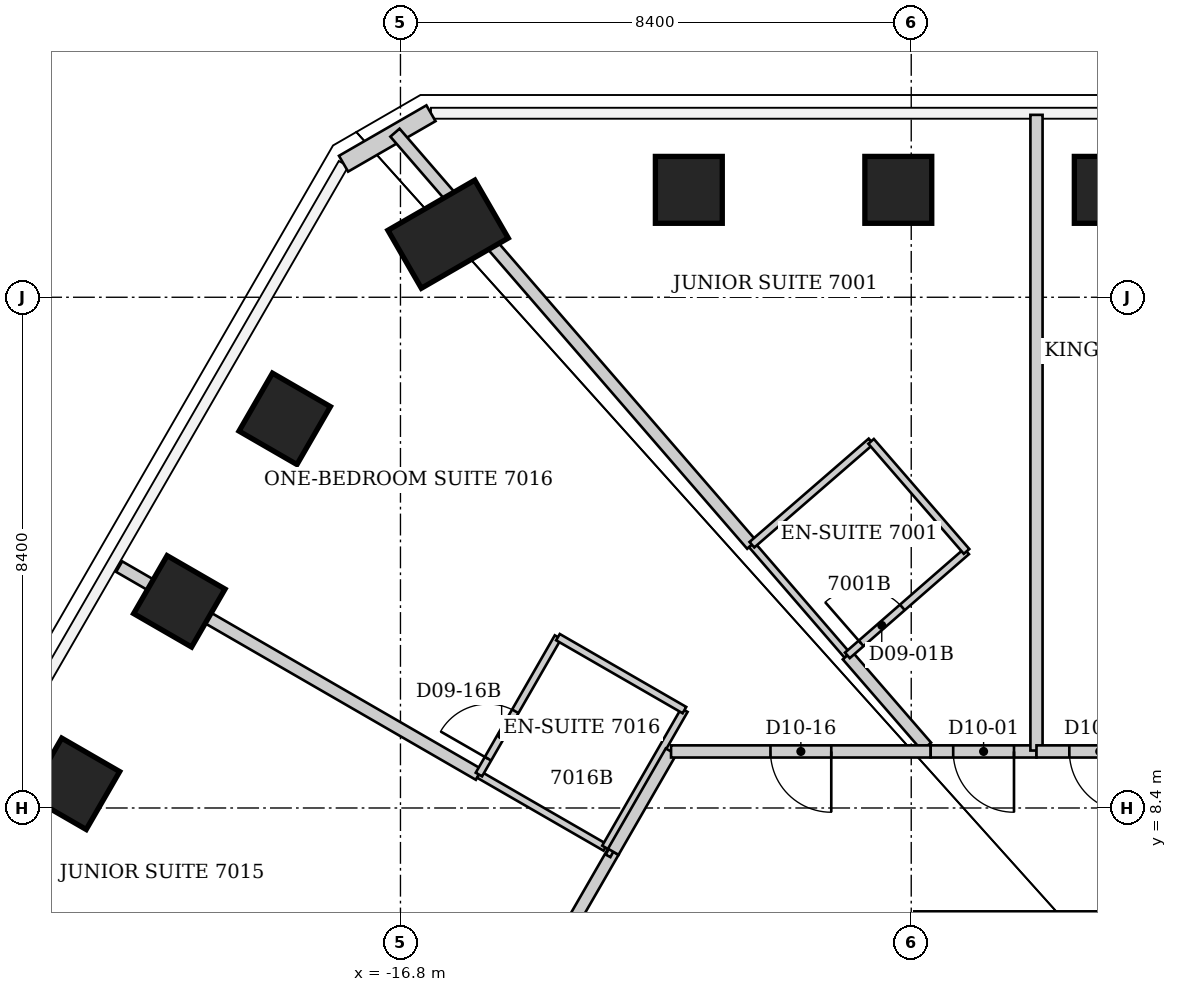
"""IFC4 building model, lengths in metres.
Left out: names, types, materials, properties, quantities, classifications, styles, units other than length and angle.
Written with IfcOpenShell. Run it as: python <this file> out.ifc"""

import sys

from ifc_helpers import new_model, si_unit, direction, frame, frame_2d, origin, origin_2d, place, context, subcontext, project, spatial, rectangle, extrude, element, fill, save


model = new_model("IFC4")
c1 = context("Model", 3, precision=1e-05, world=origin(), true_north=direction((0.0, 1.0)))
c2 = subcontext(c1, "Body", "Model", "MODEL_VIEW")
j1 = project(units=[si_unit("LENGTHUNIT", "METRE"), si_unit("PLANEANGLEUNIT", "RADIAN")], contexts=[c1])
p1 = place(None, origin())
s1 = spatial("IfcSite", under=j1, at=p1, CompositionType="ELEMENT")
p2 = place(p1, origin())
s2 = spatial("IfcBuilding", under=s1, at=p2, CompositionType="ELEMENT")
p3 = place(p2, frame((0.0, 0.0, 279.8)))
s3 = spatial("IfcBuildingStorey", under=s2, at=p3, CompositionType="ELEMENT", Elevation=279.8)
for number, where, z_axis, x_axis in (
    (1, (-12.058, 18.566, 0.0), (0.0, 0.0, 1.0), (0.0, 1.0, 0.0)),
    (2, (-8.613, 18.566, 0.0), (0.0, 0.0, 1.0), (0.0, 1.0, 0.0)),
    (3, (-5.167, 18.566, 0.0), (0.0, 0.0, 1.0), (0.0, 1.0, 0.0)),
    (4, (-22.169, 8.798, 0.0), (0.0, 0.0, 1.0), (-0.866, 0.5, 0.0)),
    (5, (-20.437, 11.799, 0.0), (0.0, 0.0, 1.0), (-0.866, 0.5, 0.0)),
    (6, (-18.704, 14.8, 0.0), (0.0, 0.0, 1.0), (-0.866, 0.5, 0.0)),
):
    element("IfcColumn", number, at=place(p3, frame(where, z_axis=z_axis, x_axis=x_axis)), inside=s3, PredefinedType="COLUMN", context=c2, shape_type="SweptSolid", body=[
        extrude(rectangle(XDim=1.1, YDim=1.1, at=origin_2d()), origin(), (0.0, 0.0, 1.0), 3.8),
    ])
p4 = place(p3, frame((-16.017, 17.837, 0.0), z_axis=(0.0, 0.0, 1.0), x_axis=(-0.5, 0.866025403784, 0.0)))
e7 = element("IfcColumn", 7, at=p4, inside=s3, PredefinedType="COLUMN", context=c2, shape_type="SweptSolid", body=[
    extrude(rectangle(XDim=1.1, YDim=1.65, at=origin_2d()), origin(), (0.0, 0.0, 1.0), 3.8),
])
p5 = place(p3, frame((-8.35, 6.4, 0.0), z_axis=(0.0, 0.0, 1.0), x_axis=(1.0, 0.0, 0.0)))
e8 = element("IfcWall", 8, at=p5, inside=s3, PredefinedType="SHEAR", context=c2, shape_type="SweptSolid", body=[
    extrude(rectangle(XDim=16.7, YDim=0.6, at=frame_2d((8.35, 0.0))), origin(), (0.0, 0.0, 1.0), 3.8),
])
p6 = place(p5, frame((6.488, 0.0, 0.0)))
e9 = element("IfcOpeningElement", 9, at=p6, cuts=e8, PredefinedType="OPENING", context=c2, shape_type="SweptSolid", body=[
    extrude(rectangle(XDim=1.1, YDim=2.1, at=frame_2d((0.55, 1.05))), frame((0.0, 0.3, 0.0), z_axis=(0.0, -1.0, 0.0), x_axis=(1.0, 0.0, 0.0)), (0.0, 0.0, 1.0), 0.6),
])
p7 = place(p5, frame((9.113, 0.0, 0.0)))
e10 = element("IfcOpeningElement", 10, at=p7, cuts=e8, PredefinedType="OPENING", context=c2, shape_type="SweptSolid", body=[
    extrude(rectangle(XDim=1.1, YDim=2.1, at=frame_2d((0.55, 1.05))), frame((0.0, 0.3, 0.0), z_axis=(0.0, -1.0, 0.0), x_axis=(1.0, 0.0, 0.0)), (0.0, 0.0, 1.0), 0.6),
])
p8 = place(p5, frame((11.738, 0.0, 0.0)))
e11 = element("IfcOpeningElement", 11, at=p8, cuts=e8, PredefinedType="OPENING", context=c2, shape_type="SweptSolid", body=[
    extrude(rectangle(XDim=1.1, YDim=2.1, at=frame_2d((0.55, 1.05))), frame((0.0, 0.3, 0.0), z_axis=(0.0, -1.0, 0.0), x_axis=(1.0, 0.0, 0.0)), (0.0, 0.0, 1.0), 0.6),
])
p9 = place(p5, frame((14.363, 0.0, 0.0)))
e12 = element("IfcOpeningElement", 12, at=p9, cuts=e8, PredefinedType="OPENING", context=c2, shape_type="SweptSolid", body=[
    extrude(rectangle(XDim=1.1, YDim=2.1, at=frame_2d((0.55, 1.05))), frame((0.0, 0.3, 0.0), z_axis=(0.0, -1.0, 0.0), x_axis=(1.0, 0.0, 0.0)), (0.0, 0.0, 1.0), 0.6),
])
p10 = place(p3, frame((-17.736, 18.996, 0.0), z_axis=(0.0, 0.0, 1.0), x_axis=(0.866026405774, 0.499998264499, 0.0)))
e13 = element("IfcWall", 13, at=p10, inside=s3, PredefinedType="SOLIDWALL", context=c2, shape_type="SweptSolid", body=[
    extrude(rectangle(XDim=1.66, YDim=0.3, at=frame_2d((0.83, 0.0))), origin(), (0.0, 0.0, 1.0), 3.64),
])
p11 = place(p3, frame((-21.426, 12.37, 0.0), z_axis=(0.0, 0.0, 1.0), x_axis=(0.86575224659, -0.500472823962, 0.0)))
e14 = element("IfcWall", 14, at=p11, inside=s3, PredefinedType="PARTITIONING", context=c2, shape_type="SweptSolid", body=[
    extrude(rectangle(XDim=6.833, YDim=0.2, at=frame_2d((3.417, 0.0))), origin(), (0.0, 0.0, 1.0), 2.878),
])
p12 = place(p3, frame((-16.89, 19.507, 0.0), z_axis=(0.0, 0.0, 1.0), x_axis=(0.654499193584, -0.756062699515, 0.0)))
e15 = element("IfcWall", 15, at=p12, inside=s3, PredefinedType="PARTITIONING", context=c2, shape_type="SweptSolid", body=[
    extrude(rectangle(XDim=8.966, YDim=0.2, at=frame_2d((4.483, 0.0))), origin(), (0.0, 0.0, 1.0), 3.64),
])
p13 = place(p3, frame((-15.64, 3.62, 0.0), z_axis=(0.0, 0.0, 1.0), x_axis=(0.499361596599, 0.866393672555, 0.0)))
e16 = element("IfcWall", 16, at=p13, inside=s3, PredefinedType="PARTITIONING", context=c2, shape_type="SweptSolid", body=[
    extrude(rectangle(XDim=4.686, YDim=0.2, at=frame_2d((2.343, 0.0))), origin(), (0.0, 0.0, 1.0), 3.64),
])
p14 = place(p13, frame((2.043, 0.0, 0.0)))
e17 = element("IfcOpeningElement", 17, at=p14, cuts=e16, PredefinedType="OPENING", context=c2, shape_type="SweptSolid", body=[
    extrude(rectangle(XDim=1.0, YDim=2.13, at=frame_2d((0.5, 1.065))), frame((0.0, 0.1, 0.0), z_axis=(0.0, -1.0, 0.0), x_axis=(1.0, 0.0, 0.0)), (0.0, 0.0, 1.0), 0.2),
])
p15 = place(p3, frame((-15.51, 8.95, 0.0), z_axis=(0.0, 0.0, 1.0), x_axis=(0.866202511239, -0.499693115345, 0.0)))
e18 = element("IfcWall", 18, at=p15, inside=s3, PredefinedType="PARTITIONING", context=c2, shape_type="SweptSolid", body=[
    extrude(rectangle(XDim=2.401, YDim=0.12, at=frame_2d((1.201, 0.0))), origin(), (0.0, 0.0, 1.0), 2.878),
])
p16 = place(p3, frame((-14.21, 11.21, 0.0), z_axis=(0.0, 0.0, 1.0), x_axis=(-0.498627694264, -0.866816256489, 0.0)))
e19 = element("IfcWall", 19, at=p16, inside=s3, PredefinedType="PARTITIONING", context=c2, shape_type="SweptSolid", body=[
    extrude(rectangle(XDim=2.607, YDim=0.12, at=frame_2d((1.304, 0.0))), origin(), (0.0, 0.0, 1.0), 3.64),
])
p17 = place(p16, frame((1.407, 0.0, 0.0)))
e20 = element("IfcOpeningElement", 20, at=p17, cuts=e19, PredefinedType="OPENING", context=c2, shape_type="SweptSolid", body=[
    extrude(rectangle(XDim=0.9, YDim=2.03, at=frame_2d((0.45, 1.015))), frame((0.0, 0.06, 0.0), z_axis=(0.0, -1.0, 0.0), x_axis=(1.0, 0.0, 0.0)), (0.0, 0.0, 1.0), 0.12),
])
p18 = place(p3, frame((-13.43, 7.75, 0.0), z_axis=(0.0, 0.0, 1.0), x_axis=(0.498557331759, 0.866856728041, 0.0)))
e21 = element("IfcWall", 21, at=p18, inside=s3, PredefinedType="PARTITIONING", context=c2, shape_type="SweptSolid", body=[
    extrude(rectangle(XDim=2.607, YDim=0.12, at=frame_2d((1.304, 0.0))), origin(), (0.0, 0.0, 1.0), 3.64),
])
p19 = place(p3, frame((-13.377, 7.721, 0.0), z_axis=(0.0, 0.0, 1.0), x_axis=(0.880650010303, -0.473767410606, 0.0)))
e22 = element("IfcWall", 22, at=p19, inside=s3, PredefinedType="PARTITIONING", context=c2, shape_type="SweptSolid", body=[
    extrude(rectangle(XDim=0.088, YDim=0.2, at=frame_2d((0.044, 0.0))), origin(), (0.0, 0.0, 1.0), 3.64),
])
p20 = place(p3, frame((-13.3, 7.68, 0.0), z_axis=(0.0, 0.0, 1.0), x_axis=(0.498911917133, 0.866652697996, 0.0)))
e23 = element("IfcWall", 23, at=p20, inside=s3, PredefinedType="PARTITIONING", context=c2, shape_type="SweptSolid", body=[
    extrude(rectangle(XDim=1.904, YDim=0.2, at=frame_2d((0.952, 0.0))), origin(), (0.0, 0.0, 1.0), 3.64),
])
p21 = place(p3, frame((-12.13, 10.01, 0.0), z_axis=(0.0, 0.0, 1.0), x_axis=(-0.866202511239, 0.499693115345, 0.0)))
e24 = element("IfcWall", 24, at=p21, inside=s3, PredefinedType="PARTITIONING", context=c2, shape_type="SweptSolid", body=[
    extrude(rectangle(XDim=2.401, YDim=0.12, at=frame_2d((1.201, 0.0))), origin(), (0.0, 0.0, 1.0), 3.64),
])
p22 = place(p3, frame((-11.022, 12.728, 0.0), z_axis=(0.0, 0.0, 1.0), x_axis=(0.654005869514, -0.756489472921, 0.0)))
e25 = element("IfcWall", 25, at=p22, inside=s3, PredefinedType="PARTITIONING", context=c2, shape_type="SweptSolid", body=[
    extrude(rectangle(XDim=2.404, YDim=0.12, at=frame_2d((1.202, 0.0))), origin(), (0.0, 0.0, 1.0), 3.64),
])
p23 = place(p3, frame((-9.45, 10.91, 0.0), z_axis=(0.0, 0.0, 1.0), x_axis=(0.655103686609, -0.755538986282, 0.0)))
e26 = element("IfcWall", 26, at=p23, inside=s3, PredefinedType="PARTITIONING", context=c2, shape_type="SweptSolid", body=[
    extrude(rectangle(XDim=1.986, YDim=0.2, at=frame_2d((0.993, 0.0))), origin(), (0.0, 0.0, 1.0), 3.64),
])
p24 = place(p3, frame((-9.45, 10.91, 0.0), z_axis=(0.0, 0.0, 1.0), x_axis=(0.753482987084, 0.657467404649, 0.0)))
e27 = element("IfcWall", 27, at=p24, inside=s3, PredefinedType="PARTITIONING", context=c2, shape_type="SweptSolid", body=[
    extrude(rectangle(XDim=2.601, YDim=0.12, at=frame_2d((1.301, 0.0))), origin(), (0.0, 0.0, 1.0), 3.64),
])
p25 = place(p24, frame((0.3, 0.0, 0.0)))
e28 = element("IfcOpeningElement", 28, at=p25, cuts=e27, PredefinedType="OPENING", context=c2, shape_type="SweptSolid", body=[
    extrude(rectangle(XDim=0.9, YDim=2.03, at=frame_2d((0.45, 1.015))), frame((0.0, 0.06, 0.0), z_axis=(0.0, -1.0, 0.0), x_axis=(1.0, 0.0, 0.0)), (0.0, 0.0, 1.0), 0.12),
])
p26 = place(p3, frame((-9.06, 14.43, 0.0), z_axis=(0.0, 0.0, 1.0), x_axis=(-0.755437535555, -0.655220672655, 0.0)))
e29 = element("IfcWall", 29, at=p26, inside=s3, PredefinedType="PARTITIONING", context=c2, shape_type="SweptSolid", body=[
    extrude(rectangle(XDim=2.594, YDim=0.12, at=frame_2d((1.297, 0.0))), origin(), (0.0, 0.0, 1.0), 3.64),
])
p27 = place(p3, frame((-8.08, 9.33, 0.0), z_axis=(0.0, 0.0, 1.0), x_axis=(-1.0, 0.0, 0.0)))
e30 = element("IfcWall", 30, at=p27, inside=s3, PredefinedType="PARTITIONING", context=c2, shape_type="SweptSolid", body=[
    extrude(rectangle(XDim=4.27, YDim=0.2, at=frame_2d((2.135, 0.0))), origin(), (0.0, 0.0, 1.0), 3.64),
])
p28 = place(p27, frame((1.635, 0.0, 0.0)))
e31 = element("IfcOpeningElement", 31, at=p28, cuts=e30, PredefinedType="OPENING", context=c2, shape_type="SweptSolid", body=[
    extrude(rectangle(XDim=1.0, YDim=2.13, at=frame_2d((0.5, 1.065))), frame((0.0, 0.1, 0.0), z_axis=(0.0, -1.0, 0.0), x_axis=(1.0, 0.0, 0.0)), (0.0, 0.0, 1.0), 0.2),
])
p29 = place(p3, frame((-7.49, 12.62, 0.0), z_axis=(0.0, 0.0, 1.0), x_axis=(-0.655302876176, 0.755366229372, 0.0)))
e32 = element("IfcWall", 32, at=p29, inside=s3, PredefinedType="PARTITIONING", context=c2, shape_type="SweptSolid", body=[
    extrude(rectangle(XDim=2.396, YDim=0.12, at=frame_2d((1.198, 0.0))), origin(), (0.0, 0.0, 1.0), 3.64),
])
p30 = place(p3, frame((-6.34, 9.33, 0.0), z_axis=(0.0, 0.0, 1.0), x_axis=(-1.0, 0.0, 0.0)))
e33 = element("IfcWall", 33, at=p30, inside=s3, PredefinedType="PARTITIONING", context=c2, shape_type="SweptSolid", body=[
    extrude(rectangle(XDim=1.74, YDim=0.2, at=frame_2d((0.87, 0.0))), origin(), (0.0, 0.0, 1.0), 3.64),
])
p31 = place(p30, frame((0.37, 0.0, 0.0)))
e34 = element("IfcOpeningElement", 34, at=p31, cuts=e33, PredefinedType="OPENING", context=c2, shape_type="SweptSolid", body=[
    extrude(rectangle(XDim=1.0, YDim=2.13, at=frame_2d((0.5, 1.065))), frame((0.0, 0.1, 0.0), z_axis=(0.0, -1.0, 0.0), x_axis=(1.0, 0.0, 0.0)), (0.0, 0.0, 1.0), 0.2),
])
p32 = place(p3, frame((-6.34, 19.8, 0.0), z_axis=(0.0, 0.0, 1.0), x_axis=(0.0, -1.0, 0.0)))
e35 = element("IfcWall", 35, at=p32, inside=s3, PredefinedType="PARTITIONING", context=c2, shape_type="SweptSolid", body=[
    extrude(rectangle(XDim=10.455, YDim=0.2, at=frame_2d((5.228, 0.0))), origin(), (0.0, 0.0, 1.0), 3.64),
])
p33 = place(p3, frame((-4.26, 9.33, 0.0), z_axis=(0.0, 0.0, 1.0), x_axis=(-1.0, 0.0, 0.0)))
e36 = element("IfcWall", 36, at=p33, inside=s3, PredefinedType="PARTITIONING", context=c2, shape_type="SweptSolid", body=[
    extrude(rectangle(XDim=2.08, YDim=0.2, at=frame_2d((1.04, 0.0))), origin(), (0.0, 0.0, 1.0), 3.64),
])
p34 = place(p33, frame((0.54, 0.0, 0.0)))
e37 = element("IfcOpeningElement", 37, at=p34, cuts=e36, PredefinedType="OPENING", context=c2, shape_type="SweptSolid", body=[
    extrude(rectangle(XDim=1.0, YDim=2.13, at=frame_2d((0.5, 1.065))), frame((0.0, 0.1, 0.0), z_axis=(0.0, -1.0, 0.0), x_axis=(1.0, 0.0, 0.0)), (0.0, 0.0, 1.0), 0.2),
])
p35 = place(p31, origin())
e38 = element("IfcDoor", 38, at=p35, inside=s3, OperationType="SINGLE_SWING_LEFT", PredefinedType="DOOR", context=c2, shape_type="SweptSolid", body=[
    extrude(rectangle(XDim=1.0, YDim=2.13, at=frame_2d((0.5, 1.065))), frame((0.0, 0.025, 0.0), z_axis=(0.0, -1.0, 0.0), x_axis=(1.0, 0.0, 0.0)), (0.0, 0.0, 1.0), 0.05),
])
fill(e34, e38)
p36 = place(p25, origin())
e39 = element("IfcDoor", 39, at=p36, inside=s3, OperationType="SINGLE_SWING_LEFT", PredefinedType="DOOR", context=c2, shape_type="SweptSolid", body=[
    extrude(rectangle(XDim=0.9, YDim=2.03, at=frame_2d((0.45, 1.015))), frame((0.0, 0.025, 0.0), z_axis=(0.0, -1.0, 0.0), x_axis=(1.0, 0.0, 0.0)), (0.0, 0.0, 1.0), 0.05),
])
fill(e28, e39)
p37 = place(p34, origin())
e40 = element("IfcDoor", 40, at=p37, inside=s3, OperationType="SINGLE_SWING_LEFT", PredefinedType="DOOR", context=c2, shape_type="SweptSolid", body=[
    extrude(rectangle(XDim=1.0, YDim=2.13, at=frame_2d((0.5, 1.065))), frame((0.0, 0.025, 0.0), z_axis=(0.0, -1.0, 0.0), x_axis=(1.0, 0.0, 0.0)), (0.0, 0.0, 1.0), 0.05),
])
fill(e37, e40)
p38 = place(p28, origin())
e41 = element("IfcDoor", 41, at=p38, inside=s3, OperationType="SINGLE_SWING_LEFT", PredefinedType="DOOR", context=c2, shape_type="SweptSolid", body=[
    extrude(rectangle(XDim=1.0, YDim=2.13, at=frame_2d((0.5, 1.065))), frame((0.0, 0.025, 0.0), z_axis=(0.0, -1.0, 0.0), x_axis=(1.0, 0.0, 0.0)), (0.0, 0.0, 1.0), 0.05),
])
fill(e31, e41)
p39 = place(p17, origin())
e42 = element("IfcDoor", 42, at=p39, inside=s3, OperationType="SINGLE_SWING_RIGHT", PredefinedType="DOOR", context=c2, shape_type="SweptSolid", body=[
    extrude(rectangle(XDim=0.9, YDim=2.03, at=frame_2d((0.45, 1.015))), frame((0.0, 0.025, 0.0), z_axis=(0.0, -1.0, 0.0), x_axis=(1.0, 0.0, 0.0)), (0.0, 0.0, 1.0), 0.05),
])
fill(e20, e42)
save(model, sys.argv[1])
